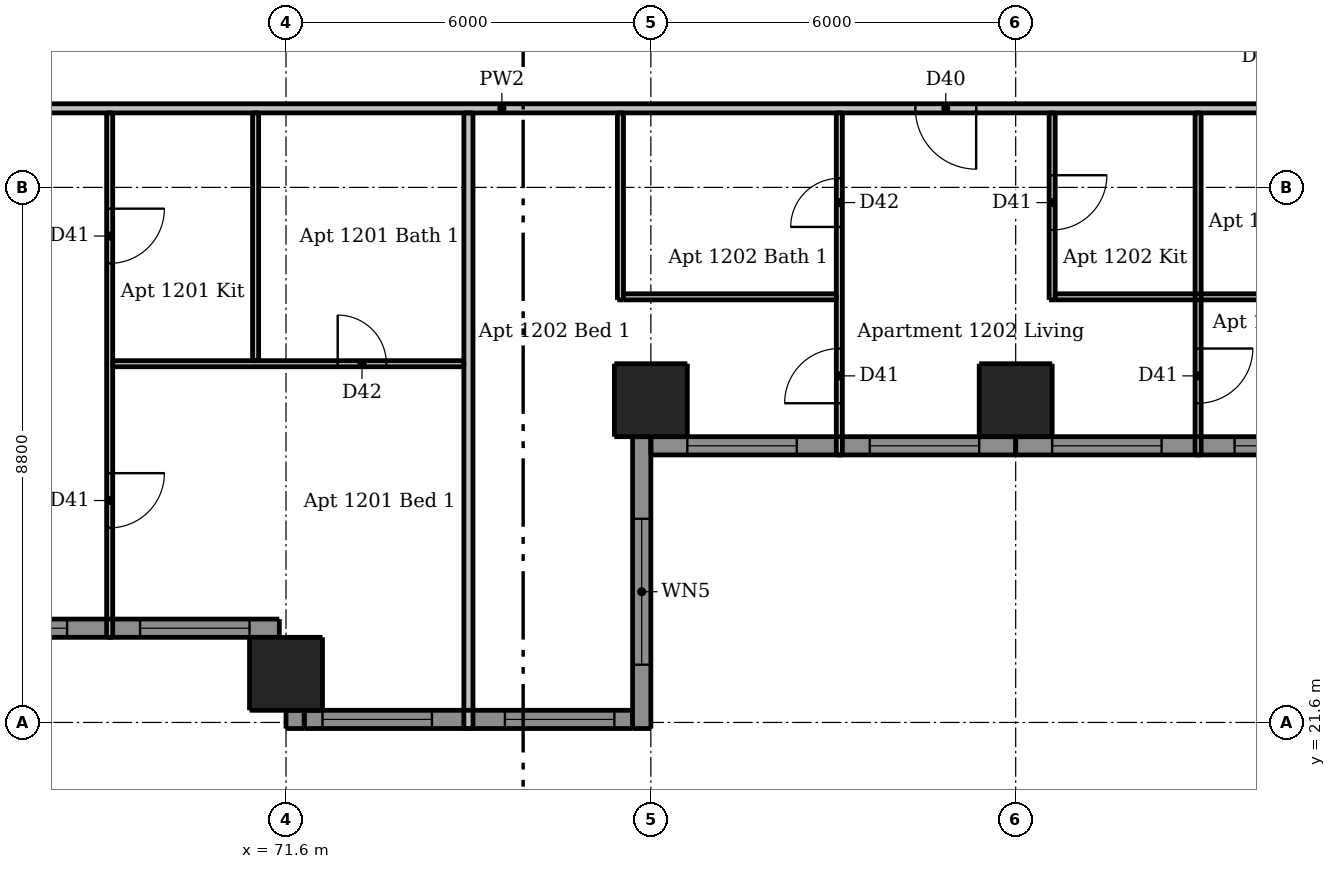
"""IFC4 building model, lengths in metres.
Left out: names, types, materials, properties, quantities, classifications, styles, units other than length and angle.
Written with IfcOpenShell. Run it as: python <this file> out.ifc"""

import sys

from ifc_helpers import new_model, si_unit, direction, frame, frame_2d, origin, origin_2d, place, context, subcontext, project, spatial, rectangle, extrude, element, fill, save


model = new_model("IFC4")
c1 = context("Model", 3, precision=1e-05, world=origin(), true_north=direction((0.0, 1.0)))
c2 = subcontext(c1, "Body", "Model", "MODEL_VIEW")
j1 = project(units=[si_unit("LENGTHUNIT", "METRE"), si_unit("PLANEANGLEUNIT", "RADIAN")], contexts=[c1])
p1 = place(None, origin())
s1 = spatial("IfcSite", under=j1, at=p1, CompositionType="ELEMENT")
p2 = place(p1, origin())
s2 = spatial("IfcBuilding", under=s1, at=p2, CompositionType="ELEMENT")
p3 = place(p2, frame((0.0, 0.0, 46.6)))
s3 = spatial("IfcBuildingStorey", under=s2, at=p3, CompositionType="ELEMENT", Elevation=46.6)
for number, where, z_axis, x_axis in (
    (1, (71.6, 22.4, 0.0), (0.0, 0.0, 1.0), (1.0, 0.0, 0.0)),
    (2, (77.6, 26.9, 0.0), (0.0, 0.0, 1.0), (1.0, 0.0, 0.0)),
    (3, (83.6, 26.9, 0.0), (0.0, 0.0, 1.0), (1.0, 0.0, 0.0)),
):
    element("IfcColumn", number, at=place(p3, frame(where, z_axis=z_axis, x_axis=x_axis)), inside=s3, PredefinedType="COLUMN", context=c2, shape_type="SweptSolid", body=[
        extrude(rectangle(XDim=1.2, YDim=1.2, at=origin_2d()), origin(), (0.0, 0.0, 1.0), 3.05),
    ])
p4 = place(p3, frame((71.75, 21.8, 0.0), z_axis=(0.0, 0.0, 1.0), x_axis=(0.0, -1.0, 0.0)))
e4 = element("IfcWall", 4, at=p4, inside=s3, PredefinedType="SOLIDWALL", context=c2, shape_type="SweptSolid", body=[
    extrude(rectangle(XDim=0.3, YDim=0.3, at=frame_2d((0.15, 0.0))), origin(), (0.0, 0.0, 1.0), 3.05),
])
p5 = place(p3, frame((77.45, 21.5, 0.0), z_axis=(0.0, 0.0, 1.0), x_axis=(0.0, 1.0, 0.0)))
e5 = element("IfcWall", 5, at=p5, inside=s3, PredefinedType="SOLIDWALL", context=c2, shape_type="SweptSolid", body=[
    extrude(rectangle(XDim=4.8, YDim=0.3, at=frame_2d((2.4, 0.0))), origin(), (0.0, 0.0, 1.0), 3.05),
])
p6 = place(p5, frame((1.05, 0.0, 0.15)))
e6 = element("IfcOpeningElement", 6, at=p6, cuts=e5, PredefinedType="OPENING", context=c2, shape_type="SweptSolid", body=[
    extrude(rectangle(XDim=2.4, YDim=2.1, at=frame_2d((1.2, 1.05))), frame((0.0, 0.16, 0.0), z_axis=(0.0, -1.0, 0.0), x_axis=(1.0, 0.0, 0.0)), (0.0, 0.0, 1.0), 0.32),
])
p7 = place(p3, frame((65.71, 23.15, 0.0), z_axis=(0.0, 0.0, 1.0), x_axis=(1.0, 0.0, 0.0)))
e7 = element("IfcWall", 7, at=p7, inside=s3, PredefinedType="SOLIDWALL", context=c2, shape_type="SweptSolid", body=[
    extrude(rectangle(XDim=5.78, YDim=0.3, at=frame_2d((2.89, 0.0))), origin(), (0.0, 0.0, 1.0), 3.05),
])
p8 = place(p7, frame((0.49, 0.0, 0.15)))
e8 = element("IfcOpeningElement", 8, at=p8, cuts=e7, PredefinedType="OPENING", context=c2, shape_type="SweptSolid", body=[
    extrude(rectangle(XDim=1.8, YDim=2.1, at=frame_2d((0.9, 1.05))), frame((0.0, 0.16, 0.0), z_axis=(0.0, -1.0, 0.0), x_axis=(1.0, 0.0, 0.0)), (0.0, 0.0, 1.0), 0.32),
])
p9 = place(p7, frame((3.49, 0.0, 0.15)))
e9 = element("IfcOpeningElement", 9, at=p9, cuts=e7, PredefinedType="OPENING", context=c2, shape_type="SweptSolid", body=[
    extrude(rectangle(XDim=1.8, YDim=2.1, at=frame_2d((0.9, 1.05))), frame((0.0, 0.16, 0.0), z_axis=(0.0, -1.0, 0.0), x_axis=(1.0, 0.0, 0.0)), (0.0, 0.0, 1.0), 0.32),
])
p10 = place(p3, frame((71.9, 21.65, 0.0), z_axis=(0.0, 0.0, 1.0), x_axis=(1.0, 0.0, 0.0)))
e10 = element("IfcWall", 10, at=p10, inside=s3, PredefinedType="SOLIDWALL", context=c2, shape_type="SweptSolid", body=[
    extrude(rectangle(XDim=5.4, YDim=0.3, at=frame_2d((2.7, 0.0))), origin(), (0.0, 0.0, 1.0), 3.05),
])
p11 = place(p10, frame((0.3, 0.0, 0.15)))
e11 = element("IfcOpeningElement", 11, at=p11, cuts=e10, PredefinedType="OPENING", context=c2, shape_type="SweptSolid", body=[
    extrude(rectangle(XDim=1.8, YDim=2.1, at=frame_2d((0.9, 1.05))), frame((0.0, 0.16, 0.0), z_axis=(0.0, -1.0, 0.0), x_axis=(1.0, 0.0, 0.0)), (0.0, 0.0, 1.0), 0.32),
])
p12 = place(p10, frame((3.3, 0.0, 0.15)))
e12 = element("IfcOpeningElement", 12, at=p12, cuts=e10, PredefinedType="OPENING", context=c2, shape_type="SweptSolid", body=[
    extrude(rectangle(XDim=1.8, YDim=2.1, at=frame_2d((0.9, 1.05))), frame((0.0, 0.16, 0.0), z_axis=(0.0, -1.0, 0.0), x_axis=(1.0, 0.0, 0.0)), (0.0, 0.0, 1.0), 0.32),
])
p13 = place(p3, frame((77.6, 26.15, 0.0), z_axis=(0.0, 0.0, 1.0), x_axis=(1.0, 0.0, 0.0)))
e13 = element("IfcWall", 13, at=p13, inside=s3, PredefinedType="SOLIDWALL", context=c2, shape_type="SweptSolid", body=[
    extrude(rectangle(XDim=6.0, YDim=0.3, at=frame_2d((3.0, 0.0))), origin(), (0.0, 0.0, 1.0), 3.05),
])
p14 = place(p13, frame((0.6, 0.0, 0.15)))
e14 = element("IfcOpeningElement", 14, at=p14, cuts=e13, PredefinedType="OPENING", context=c2, shape_type="SweptSolid", body=[
    extrude(rectangle(XDim=1.8, YDim=2.1, at=frame_2d((0.9, 1.05))), frame((0.0, 0.16, 0.0), z_axis=(0.0, -1.0, 0.0), x_axis=(1.0, 0.0, 0.0)), (0.0, 0.0, 1.0), 0.32),
])
p15 = place(p13, frame((3.6, 0.0, 0.15)))
e15 = element("IfcOpeningElement", 15, at=p15, cuts=e13, PredefinedType="OPENING", context=c2, shape_type="SweptSolid", body=[
    extrude(rectangle(XDim=1.8, YDim=2.1, at=frame_2d((0.9, 1.05))), frame((0.0, 0.16, 0.0), z_axis=(0.0, -1.0, 0.0), x_axis=(1.0, 0.0, 0.0)), (0.0, 0.0, 1.0), 0.32),
])
p16 = place(p3, frame((83.6, 26.15, 0.0), z_axis=(0.0, 0.0, 1.0), x_axis=(1.0, 0.0, 0.0)))
e16 = element("IfcWall", 16, at=p16, inside=s3, PredefinedType="SOLIDWALL", context=c2, shape_type="SweptSolid", body=[
    extrude(rectangle(XDim=5.89, YDim=0.3, at=frame_2d((2.945, 0.0))), origin(), (0.0, 0.0, 1.0), 3.05),
])
p17 = place(p16, frame((0.6, 0.0, 0.15)))
e17 = element("IfcOpeningElement", 17, at=p17, cuts=e16, PredefinedType="OPENING", context=c2, shape_type="SweptSolid", body=[
    extrude(rectangle(XDim=1.8, YDim=2.1, at=frame_2d((0.9, 1.05))), frame((0.0, 0.16, 0.0), z_axis=(0.0, -1.0, 0.0), x_axis=(1.0, 0.0, 0.0)), (0.0, 0.0, 1.0), 0.32),
])
p18 = place(p16, frame((3.6, 0.0, 0.15)))
e18 = element("IfcOpeningElement", 18, at=p18, cuts=e16, PredefinedType="OPENING", context=c2, shape_type="SweptSolid", body=[
    extrude(rectangle(XDim=1.8, YDim=2.1, at=frame_2d((0.9, 1.05))), frame((0.0, 0.16, 0.0), z_axis=(0.0, -1.0, 0.0), x_axis=(1.0, 0.0, 0.0)), (0.0, 0.0, 1.0), 0.32),
])
p19 = place(p3, frame((68.7, 31.625, 0.0), z_axis=(0.0, 0.0, 1.0), x_axis=(0.0, -1.0, 0.0)))
e19 = element("IfcWall", 19, at=p19, inside=s3, PredefinedType="PARTITIONING", context=c2, shape_type="SweptSolid", body=[
    extrude(rectangle(XDim=8.625, YDim=0.1, at=frame_2d((4.312, 0.0))), origin(), (0.0, 0.0, 1.0), 3.05),
])
p20 = place(p19, frame((1.575, 0.0, 0.0)))
e20 = element("IfcOpeningElement", 20, at=p20, cuts=e19, PredefinedType="OPENING", context=c2, shape_type="SweptSolid", body=[
    extrude(rectangle(XDim=0.9, YDim=2.1, at=frame_2d((0.45, 1.05))), frame((0.0, 0.06, 0.0), z_axis=(0.0, -1.0, 0.0), x_axis=(1.0, 0.0, 0.0)), (0.0, 0.0, 1.0), 0.12),
])
p21 = place(p19, frame((5.925, 0.0, 0.0)))
e21 = element("IfcOpeningElement", 21, at=p21, cuts=e19, PredefinedType="OPENING", context=c2, shape_type="SweptSolid", body=[
    extrude(rectangle(XDim=0.9, YDim=2.1, at=frame_2d((0.45, 1.05))), frame((0.0, 0.06, 0.0), z_axis=(0.0, -1.0, 0.0), x_axis=(1.0, 0.0, 0.0)), (0.0, 0.0, 1.0), 0.12),
])
p22 = place(p3, frame((71.1, 27.55, 0.0), z_axis=(0.0, 0.0, 1.0), x_axis=(0.0, 1.0, 0.0)))
e22 = element("IfcWall", 22, at=p22, inside=s3, PredefinedType="PARTITIONING", context=c2, shape_type="SweptSolid", body=[
    extrude(rectangle(XDim=4.075, YDim=0.1, at=frame_2d((2.038, 0.0))), origin(), (0.0, 0.0, 1.0), 3.05),
])
p23 = place(p3, frame((77.1, 28.55, 0.0), z_axis=(0.0, 0.0, 1.0), x_axis=(0.0, 1.0, 0.0)))
e23 = element("IfcWall", 23, at=p23, inside=s3, PredefinedType="PARTITIONING", context=c2, shape_type="SweptSolid", body=[
    extrude(rectangle(XDim=3.075, YDim=0.1, at=frame_2d((1.538, 0.0))), origin(), (0.0, 0.0, 1.0), 3.05),
])
p24 = place(p3, frame((80.7, 26.0, 0.0), z_axis=(0.0, 0.0, 1.0), x_axis=(0.0, 1.0, 0.0)))
e24 = element("IfcWall", 24, at=p24, inside=s3, PredefinedType="PARTITIONING", context=c2, shape_type="SweptSolid", body=[
    extrude(rectangle(XDim=5.625, YDim=0.1, at=frame_2d((2.812, 0.0))), origin(), (0.0, 0.0, 1.0), 3.05),
])
p25 = place(p24, frame((0.85, 0.0, 0.0)))
e25 = element("IfcOpeningElement", 25, at=p25, cuts=e24, PredefinedType="OPENING", context=c2, shape_type="SweptSolid", body=[
    extrude(rectangle(XDim=0.9, YDim=2.1, at=frame_2d((0.45, 1.05))), frame((0.0, 0.06, 0.0), z_axis=(0.0, -1.0, 0.0), x_axis=(1.0, 0.0, 0.0)), (0.0, 0.0, 1.0), 0.12),
])
p26 = place(p24, frame((3.75, 0.0, 0.0)))
e26 = element("IfcOpeningElement", 26, at=p26, cuts=e24, PredefinedType="OPENING", context=c2, shape_type="SweptSolid", body=[
    extrude(rectangle(XDim=0.8, YDim=2.1, at=frame_2d((0.4, 1.05))), frame((0.0, 0.06, 0.0), z_axis=(0.0, -1.0, 0.0), x_axis=(1.0, 0.0, 0.0)), (0.0, 0.0, 1.0), 0.12),
])
p27 = place(p3, frame((84.2, 31.625, 0.0), z_axis=(0.0, 0.0, 1.0), x_axis=(0.0, -1.0, 0.0)))
e27 = element("IfcWall", 27, at=p27, inside=s3, PredefinedType="PARTITIONING", context=c2, shape_type="SweptSolid", body=[
    extrude(rectangle(XDim=3.075, YDim=0.1, at=frame_2d((1.538, 0.0))), origin(), (0.0, 0.0, 1.0), 3.05),
])
p28 = place(p27, frame((1.025, 0.0, 0.0)))
e28 = element("IfcOpeningElement", 28, at=p28, cuts=e27, PredefinedType="OPENING", context=c2, shape_type="SweptSolid", body=[
    extrude(rectangle(XDim=0.9, YDim=2.1, at=frame_2d((0.45, 1.05))), frame((0.0, 0.06, 0.0), z_axis=(0.0, -1.0, 0.0), x_axis=(1.0, 0.0, 0.0)), (0.0, 0.0, 1.0), 0.12),
])
p29 = place(p3, frame((86.6, 31.625, 0.0), z_axis=(0.0, 0.0, 1.0), x_axis=(0.0, -1.0, 0.0)))
e29 = element("IfcWall", 29, at=p29, inside=s3, PredefinedType="PARTITIONING", context=c2, shape_type="SweptSolid", body=[
    extrude(rectangle(XDim=5.625, YDim=0.1, at=frame_2d((2.812, 0.0))), origin(), (0.0, 0.0, 1.0), 3.05),
])
p30 = place(p29, frame((3.875, 0.0, 0.0)))
e30 = element("IfcOpeningElement", 30, at=p30, cuts=e29, PredefinedType="OPENING", context=c2, shape_type="SweptSolid", body=[
    extrude(rectangle(XDim=0.9, YDim=2.1, at=frame_2d((0.45, 1.05))), frame((0.0, 0.06, 0.0), z_axis=(0.0, -1.0, 0.0), x_axis=(1.0, 0.0, 0.0)), (0.0, 0.0, 1.0), 0.12),
])
p31 = place(p3, frame((77.15, 28.6, 0.0), z_axis=(0.0, 0.0, 1.0), x_axis=(1.0, 0.0, 0.0)))
e31 = element("IfcWall", 31, at=p31, inside=s3, PredefinedType="PARTITIONING", context=c2, shape_type="SweptSolid", body=[
    extrude(rectangle(XDim=3.5, YDim=0.1, at=frame_2d((1.75, 0.0))), origin(), (0.0, 0.0, 1.0), 3.05),
])
p32 = place(p3, frame((84.25, 28.6, 0.0), z_axis=(0.0, 0.0, 1.0), x_axis=(1.0, 0.0, 0.0)))
e32 = element("IfcWall", 32, at=p32, inside=s3, PredefinedType="PARTITIONING", context=c2, shape_type="SweptSolid", body=[
    extrude(rectangle(XDim=5.275, YDim=0.1, at=frame_2d((2.637, 0.0))), origin(), (0.0, 0.0, 1.0), 3.05),
])
p33 = place(p32, frame((3.45, 0.0, 0.0)))
e33 = element("IfcOpeningElement", 33, at=p33, cuts=e32, PredefinedType="OPENING", context=c2, shape_type="SweptSolid", body=[
    extrude(rectangle(XDim=0.8, YDim=2.1, at=frame_2d((0.4, 1.05))), frame((0.0, 0.06, 0.0), z_axis=(0.0, -1.0, 0.0), x_axis=(1.0, 0.0, 0.0)), (0.0, 0.0, 1.0), 0.12),
])
p34 = place(p3, frame((68.75, 27.5, 0.0), z_axis=(0.0, 0.0, 1.0), x_axis=(1.0, 0.0, 0.0)))
e34 = element("IfcWall", 34, at=p34, inside=s3, PredefinedType="PARTITIONING", context=c2, shape_type="SweptSolid", body=[
    extrude(rectangle(XDim=5.775, YDim=0.1, at=frame_2d((2.887, 0.0))), origin(), (0.0, 0.0, 1.0), 3.05),
])
p35 = place(p34, frame((3.7, 0.0, 0.0)))
e35 = element("IfcOpeningElement", 35, at=p35, cuts=e34, PredefinedType="OPENING", context=c2, shape_type="SweptSolid", body=[
    extrude(rectangle(XDim=0.8, YDim=2.1, at=frame_2d((0.4, 1.05))), frame((0.0, 0.06, 0.0), z_axis=(0.0, -1.0, 0.0), x_axis=(1.0, 0.0, 0.0)), (0.0, 0.0, 1.0), 0.12),
])
p36 = place(p3, frame((74.6, 21.5, 0.0), z_axis=(0.0, 0.0, 1.0), x_axis=(0.0, 1.0, 0.0)))
e36 = element("IfcWall", 36, at=p36, inside=s3, PredefinedType="PARTITIONING", context=c2, shape_type="SweptSolid", body=[
    extrude(rectangle(XDim=10.125, YDim=0.15, at=frame_2d((5.062, 0.0))), origin(), (0.0, 0.0, 1.0), 3.05),
])
p37 = place(p3, frame((89.525, 31.7, 0.0), z_axis=(0.0, 0.0, 1.0), x_axis=(-1.0, 0.0, 0.0)))
e37 = element("IfcWall", 37, at=p37, inside=s3, PredefinedType="PARTITIONING", context=c2, shape_type="SweptSolid", body=[
    extrude(rectangle(XDim=28.75, YDim=0.15, at=frame_2d((14.375, 0.0))), origin(), (0.0, 0.0, 1.0), 3.05),
])
p38 = place(p37, frame((24.325, 0.0, 0.0)))
e38 = element("IfcOpeningElement", 38, at=p38, cuts=e37, PredefinedType="OPENING", context=c2, shape_type="SweptSolid", body=[
    extrude(rectangle(XDim=1.0, YDim=2.1, at=frame_2d((0.5, 1.05))), frame((0.0, 0.085, 0.0), z_axis=(0.0, -1.0, 0.0), x_axis=(1.0, 0.0, 0.0)), (0.0, 0.0, 1.0), 0.17),
])
p39 = place(p37, frame((6.575, 0.0, 0.0)))
e39 = element("IfcOpeningElement", 39, at=p39, cuts=e37, PredefinedType="OPENING", context=c2, shape_type="SweptSolid", body=[
    extrude(rectangle(XDim=1.0, YDim=2.1, at=frame_2d((0.5, 1.05))), frame((0.0, 0.085, 0.0), z_axis=(0.0, -1.0, 0.0), x_axis=(1.0, 0.0, 0.0)), (0.0, 0.0, 1.0), 0.17),
])
p40 = place(p6, origin())
e40 = element("IfcWindow", 40, at=p40, inside=s3, PartitioningType="DOUBLE_PANEL_VERTICAL", PredefinedType="WINDOW", context=c2, shape_type="SweptSolid", body=[
    extrude(rectangle(XDim=2.4, YDim=2.1, at=frame_2d((1.2, 1.05))), frame((0.0, 0.03, 0.0), z_axis=(0.0, -1.0, 0.0), x_axis=(1.0, 0.0, 0.0)), (0.0, 0.0, 1.0), 0.06),
])
fill(e6, e40)
p41 = place(p8, origin())
e41 = element("IfcWindow", 41, at=p41, inside=s3, PartitioningType="DOUBLE_PANEL_VERTICAL", PredefinedType="WINDOW", context=c2, shape_type="SweptSolid", body=[
    extrude(rectangle(XDim=1.8, YDim=2.1, at=frame_2d((0.9, 1.05))), frame((0.0, 0.03, 0.0), z_axis=(0.0, -1.0, 0.0), x_axis=(1.0, 0.0, 0.0)), (0.0, 0.0, 1.0), 0.06),
])
fill(e8, e41)
p42 = place(p9, origin())
e42 = element("IfcWindow", 42, at=p42, inside=s3, PartitioningType="DOUBLE_PANEL_VERTICAL", PredefinedType="WINDOW", context=c2, shape_type="SweptSolid", body=[
    extrude(rectangle(XDim=1.8, YDim=2.1, at=frame_2d((0.9, 1.05))), frame((0.0, 0.03, 0.0), z_axis=(0.0, -1.0, 0.0), x_axis=(1.0, 0.0, 0.0)), (0.0, 0.0, 1.0), 0.06),
])
fill(e9, e42)
p43 = place(p11, origin())
e43 = element("IfcWindow", 43, at=p43, inside=s3, PartitioningType="DOUBLE_PANEL_VERTICAL", PredefinedType="WINDOW", context=c2, shape_type="SweptSolid", body=[
    extrude(rectangle(XDim=1.8, YDim=2.1, at=frame_2d((0.9, 1.05))), frame((0.0, 0.03, 0.0), z_axis=(0.0, -1.0, 0.0), x_axis=(1.0, 0.0, 0.0)), (0.0, 0.0, 1.0), 0.06),
])
fill(e11, e43)
p44 = place(p12, origin())
e44 = element("IfcWindow", 44, at=p44, inside=s3, PartitioningType="DOUBLE_PANEL_VERTICAL", PredefinedType="WINDOW", context=c2, shape_type="SweptSolid", body=[
    extrude(rectangle(XDim=1.8, YDim=2.1, at=frame_2d((0.9, 1.05))), frame((0.0, 0.03, 0.0), z_axis=(0.0, -1.0, 0.0), x_axis=(1.0, 0.0, 0.0)), (0.0, 0.0, 1.0), 0.06),
])
fill(e12, e44)
p45 = place(p14, origin())
e45 = element("IfcWindow", 45, at=p45, inside=s3, PartitioningType="DOUBLE_PANEL_VERTICAL", PredefinedType="WINDOW", context=c2, shape_type="SweptSolid", body=[
    extrude(rectangle(XDim=1.8, YDim=2.1, at=frame_2d((0.9, 1.05))), frame((0.0, 0.03, 0.0), z_axis=(0.0, -1.0, 0.0), x_axis=(1.0, 0.0, 0.0)), (0.0, 0.0, 1.0), 0.06),
])
fill(e14, e45)
p46 = place(p15, origin())
e46 = element("IfcWindow", 46, at=p46, inside=s3, PartitioningType="DOUBLE_PANEL_VERTICAL", PredefinedType="WINDOW", context=c2, shape_type="SweptSolid", body=[
    extrude(rectangle(XDim=1.8, YDim=2.1, at=frame_2d((0.9, 1.05))), frame((0.0, 0.03, 0.0), z_axis=(0.0, -1.0, 0.0), x_axis=(1.0, 0.0, 0.0)), (0.0, 0.0, 1.0), 0.06),
])
fill(e15, e46)
p47 = place(p17, origin())
e47 = element("IfcWindow", 47, at=p47, inside=s3, PartitioningType="DOUBLE_PANEL_VERTICAL", PredefinedType="WINDOW", context=c2, shape_type="SweptSolid", body=[
    extrude(rectangle(XDim=1.8, YDim=2.1, at=frame_2d((0.9, 1.05))), frame((0.0, 0.03, 0.0), z_axis=(0.0, -1.0, 0.0), x_axis=(1.0, 0.0, 0.0)), (0.0, 0.0, 1.0), 0.06),
])
fill(e17, e47)
p48 = place(p18, origin())
e48 = element("IfcWindow", 48, at=p48, inside=s3, PartitioningType="DOUBLE_PANEL_VERTICAL", PredefinedType="WINDOW", context=c2, shape_type="SweptSolid", body=[
    extrude(rectangle(XDim=1.8, YDim=2.1, at=frame_2d((0.9, 1.05))), frame((0.0, 0.03, 0.0), z_axis=(0.0, -1.0, 0.0), x_axis=(1.0, 0.0, 0.0)), (0.0, 0.0, 1.0), 0.06),
])
fill(e18, e48)
p49 = place(p20, origin())
e49 = element("IfcDoor", 49, at=p49, inside=s3, OperationType="SINGLE_SWING_LEFT", PredefinedType="DOOR", context=c2, shape_type="SweptSolid", body=[
    extrude(rectangle(XDim=0.9, YDim=2.1, at=frame_2d((0.45, 1.05))), frame((0.0, 0.025, 0.0), z_axis=(0.0, -1.0, 0.0), x_axis=(1.0, 0.0, 0.0)), (0.0, 0.0, 1.0), 0.05),
])
fill(e20, e49)
p50 = place(p21, origin())
e50 = element("IfcDoor", 50, at=p50, inside=s3, OperationType="SINGLE_SWING_LEFT", PredefinedType="DOOR", context=c2, shape_type="SweptSolid", body=[
    extrude(rectangle(XDim=0.9, YDim=2.1, at=frame_2d((0.45, 1.05))), frame((0.0, 0.025, 0.0), z_axis=(0.0, -1.0, 0.0), x_axis=(1.0, 0.0, 0.0)), (0.0, 0.0, 1.0), 0.05),
])
fill(e21, e50)
p51 = place(p35, origin())
e51 = element("IfcDoor", 51, at=p51, inside=s3, OperationType="SINGLE_SWING_LEFT", PredefinedType="DOOR", context=c2, shape_type="SweptSolid", body=[
    extrude(rectangle(XDim=0.8, YDim=2.1, at=frame_2d((0.4, 1.05))), frame((0.0, 0.025, 0.0), z_axis=(0.0, -1.0, 0.0), x_axis=(1.0, 0.0, 0.0)), (0.0, 0.0, 1.0), 0.05),
])
fill(e35, e51)
p52 = place(p39, origin())
e52 = element("IfcDoor", 52, at=p52, inside=s3, OperationType="SINGLE_SWING_LEFT", PredefinedType="DOOR", context=c2, shape_type="SweptSolid", body=[
    extrude(rectangle(XDim=1.0, YDim=2.1, at=frame_2d((0.5, 1.05))), frame((0.0, 0.025, 0.0), z_axis=(0.0, -1.0, 0.0), x_axis=(1.0, 0.0, 0.0)), (0.0, 0.0, 1.0), 0.05),
])
fill(e39, e52)
p53 = place(p28, origin())
e53 = element("IfcDoor", 53, at=p53, inside=s3, OperationType="SINGLE_SWING_LEFT", PredefinedType="DOOR", context=c2, shape_type="SweptSolid", body=[
    extrude(rectangle(XDim=0.9, YDim=2.1, at=frame_2d((0.45, 1.05))), frame((0.0, 0.025, 0.0), z_axis=(0.0, -1.0, 0.0), x_axis=(1.0, 0.0, 0.0)), (0.0, 0.0, 1.0), 0.05),
])
fill(e28, e53)
p54 = place(p25, origin())
e54 = element("IfcDoor", 54, at=p54, inside=s3, OperationType="SINGLE_SWING_LEFT", PredefinedType="DOOR", context=c2, shape_type="SweptSolid", body=[
    extrude(rectangle(XDim=0.9, YDim=2.1, at=frame_2d((0.45, 1.05))), frame((0.0, 0.025, 0.0), z_axis=(0.0, -1.0, 0.0), x_axis=(1.0, 0.0, 0.0)), (0.0, 0.0, 1.0), 0.05),
])
fill(e25, e54)
p55 = place(p26, origin())
e55 = element("IfcDoor", 55, at=p55, inside=s3, OperationType="SINGLE_SWING_LEFT", PredefinedType="DOOR", context=c2, shape_type="SweptSolid", body=[
    extrude(rectangle(XDim=0.8, YDim=2.1, at=frame_2d((0.4, 1.05))), frame((0.0, 0.025, 0.0), z_axis=(0.0, -1.0, 0.0), x_axis=(1.0, 0.0, 0.0)), (0.0, 0.0, 1.0), 0.05),
])
fill(e26, e55)
p56 = place(p30, origin())
e56 = element("IfcDoor", 56, at=p56, inside=s3, OperationType="SINGLE_SWING_LEFT", PredefinedType="DOOR", context=c2, shape_type="SweptSolid", body=[
    extrude(rectangle(XDim=0.9, YDim=2.1, at=frame_2d((0.45, 1.05))), frame((0.0, 0.025, 0.0), z_axis=(0.0, -1.0, 0.0), x_axis=(1.0, 0.0, 0.0)), (0.0, 0.0, 1.0), 0.05),
])
fill(e30, e56)
save(model, sys.argv[1])
